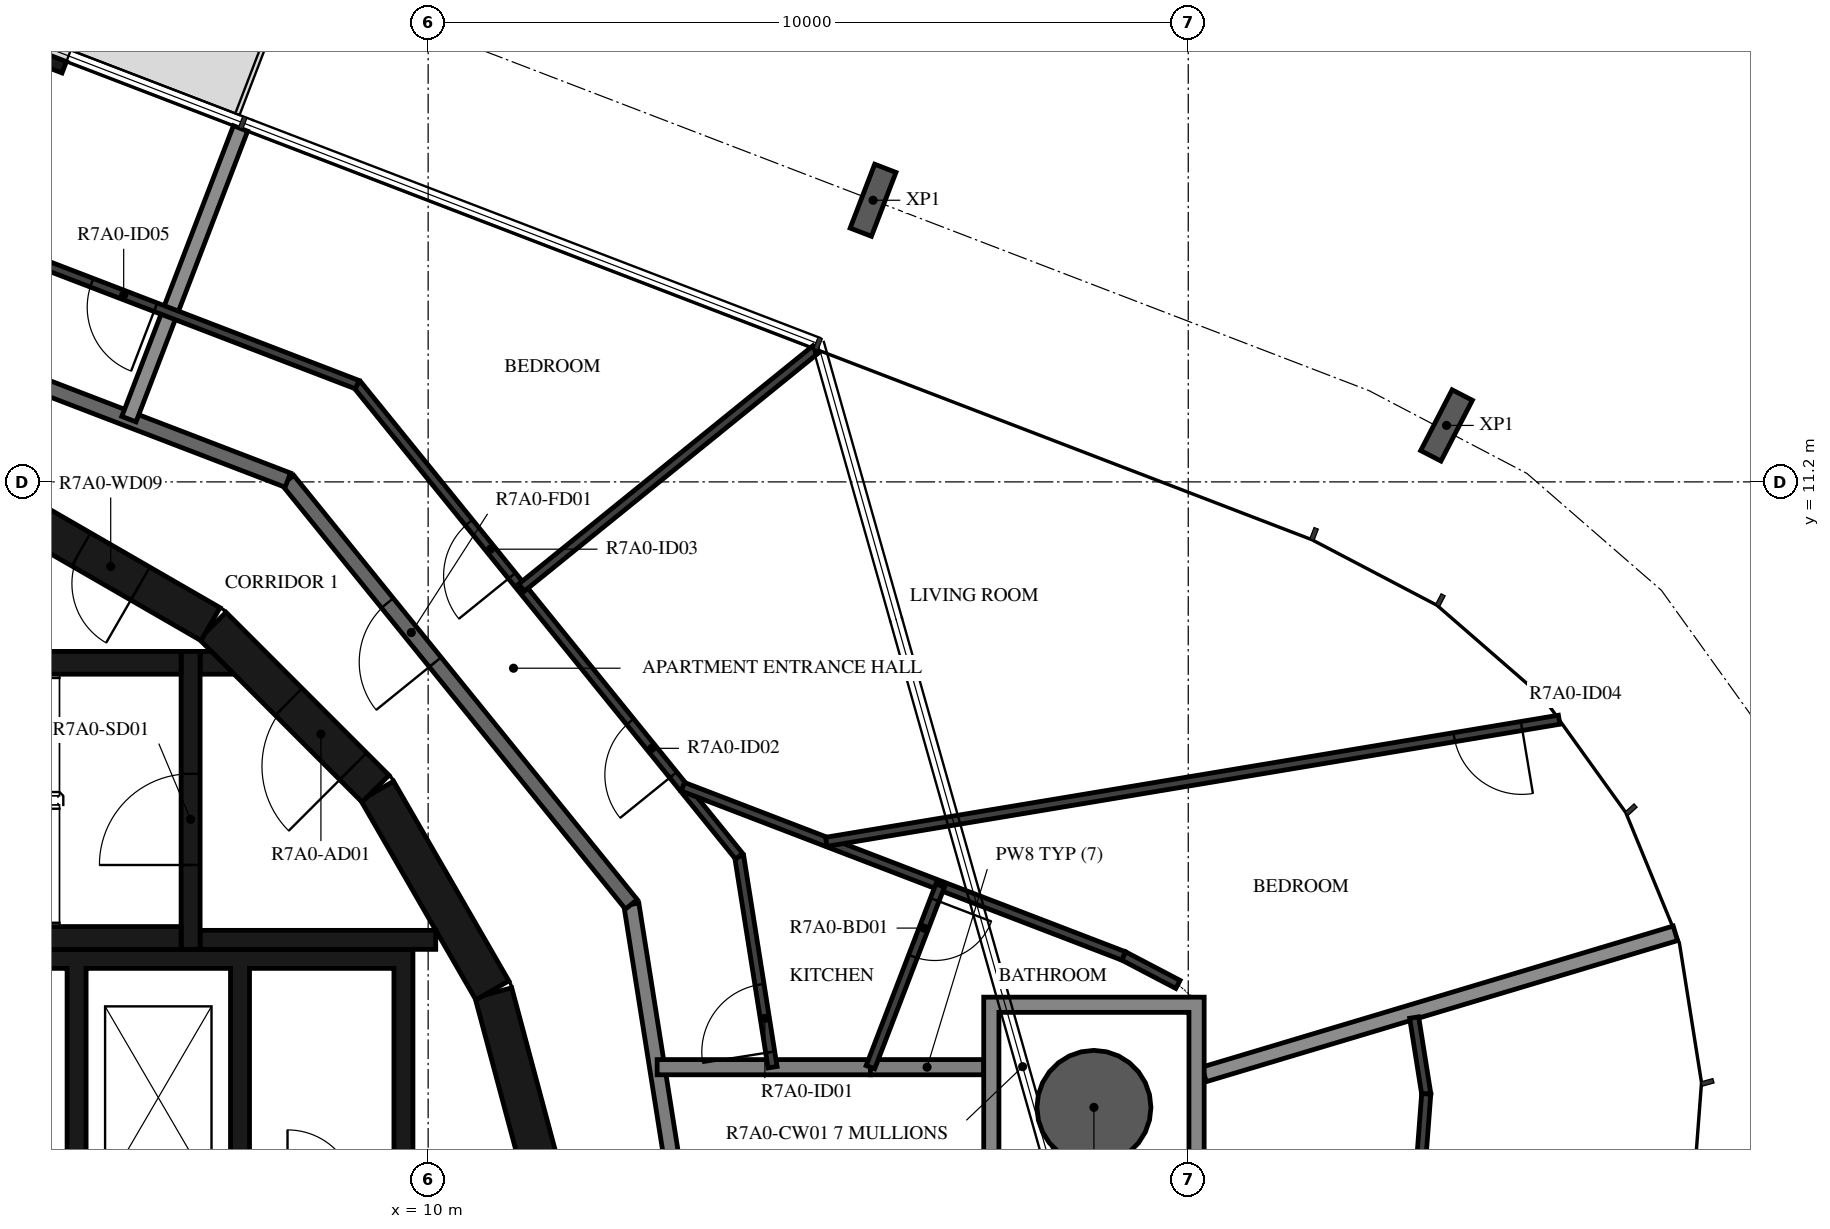
"""IFC4 building model, lengths in metres.
Left out: names, types, materials, properties, quantities, classifications, styles, units other than length and angle.
Written with IfcOpenShell. Run it as: python <this file> out.ifc"""

import sys

from ifc_helpers import new_model, si_unit, direction, frame, frame_2d, origin, origin_2d, place, context, subcontext, project, spatial, polyline, rectangle, hollow_circle, i_section, outline, extrude, element, fill, save


model = new_model("IFC4")
c1 = context("Model", 3, precision=1e-05, world=origin(), true_north=direction((0.0, 1.0)))
c2 = subcontext(c1, "Body", "Model", "MODEL_VIEW")
j1 = project(units=[si_unit("LENGTHUNIT", "METRE"), si_unit("PLANEANGLEUNIT", "RADIAN")], contexts=[c1])
p1 = place(None, origin())
s1 = spatial("IfcSite", under=j1, at=p1, CompositionType="ELEMENT")
p2 = place(p1, origin())
s2 = spatial("IfcBuilding", under=s1, at=p2, CompositionType="ELEMENT")
p3 = place(p2, frame((0.0, 0.0, 270.4)))
s3 = spatial("IfcBuildingStorey", under=s2, at=p3, CompositionType="ELEMENT", Elevation=270.4)
p4 = place(p3, frame((18.76, 2.971, -0.38), z_axis=(0.0, 0.0, 1.0), x_axis=(1.0, 0.0, 0.0)))
e1 = element("IfcColumn", 1, at=p4, inside=s3, PredefinedType="COLUMN", context=c2, shape_type="SweptSolid", body=[
    extrude(hollow_circle(Radius=0.75, WallThickness=0.035, at=origin_2d()), origin(), (0.0, 0.0, 1.0), 3.5),
])
for number, where, z_axis, x_axis in (
    (2, (23.398, 11.943, -0.38), (0.0, 0.0, 1.0), (0.888, -0.459, 0.0)),
    (3, (15.854, 14.905, -0.38), (0.0, 0.0, 1.0), (0.934, -0.358, 0.0)),
):
    element("IfcColumn", number, at=place(p3, frame(where, z_axis=z_axis, x_axis=x_axis)), inside=s3, PredefinedType="COLUMN", context=c2, shape_type="SweptSolid", body=[
        extrude(i_section(OverallWidth=0.3, OverallDepth=0.9, WebThickness=0.019, FlangeThickness=0.035, FilletRadius=0.03, at=origin_2d()), origin(), (0.0, 0.0, 1.0), 3.5),
    ])
p5 = place(p3, frame((5.212, 16.655, 0.0), z_axis=(0.0, 0.0, 1.0), x_axis=(-0.933579413923, 0.358370587381, 0.0)))
e4 = element("IfcWall", 4, at=p5, inside=s3, PredefinedType="STANDARD", context=c2, shape_type="SweptSolid", body=[
    extrude(rectangle(XDim=3.2, YDim=0.16, at=frame_2d((1.6, 0.0))), origin(), (0.0, 0.0, 1.0), 3.12),
])
p6 = place(p5, frame((0.4, 0.0, 0.0)))
e5 = element("IfcOpeningElement", 5, at=p6, cuts=e4, PredefinedType="OPENING", context=c2, shape_type="SweptSolid", body=[
    extrude(rectangle(XDim=2.4, YDim=2.4, at=frame_2d((1.2, 1.2))), frame((0.0, 0.09, 0.0), z_axis=(0.0, -1.0, 0.0), x_axis=(1.0, 0.0, 0.0)), (0.0, 0.0, 1.0), 0.18),
])
for number, where, z_axis, x_axis in (
    (6, (11.643, 1.55, 0.0), (0.0, 0.0, 1.0), (-0.259, 0.966, 0.0)),
    (7, (10.845, 4.51, 0.0), (0.0, 0.0, 1.0), (-0.5, 0.866, 0.0)),
):
    element("IfcWall", number, at=place(p3, frame(where, z_axis=z_axis, x_axis=x_axis)), inside=s3, PredefinedType="SHEAR", context=c2, shape_type="SweptSolid", body=[
        extrude(rectangle(XDim=3.033, YDim=0.5, at=frame_2d((1.516, 0.0))), origin(), (0.0, 0.0, 1.0), 3.12),
    ])
p7 = place(p3, frame((9.308, 7.164, 0.0), z_axis=(0.0, 0.0, 1.0), x_axis=(-0.707106781187, 0.707106781187, 0.0)))
e8 = element("IfcWall", 8, at=p7, inside=s3, PredefinedType="SHEAR", context=c2, shape_type="SweptSolid", body=[
    extrude(rectangle(XDim=3.032, YDim=0.5, at=frame_2d((1.516, 0.0))), origin(), (0.0, 0.0, 1.0), 3.12),
])
p8 = place(p7, frame((0.416, 0.0, 0.0)))
e9 = element("IfcOpeningElement", 9, at=p8, cuts=e8, PredefinedType="OPENING", context=c2, shape_type="SweptSolid", body=[
    extrude(rectangle(XDim=1.2, YDim=2.1, at=frame_2d((0.6, 1.05))), frame((0.0, 0.26, 0.0), z_axis=(0.0, -1.0, 0.0), x_axis=(1.0, 0.0, 0.0)), (0.0, 0.0, 1.0), 0.52),
])
p9 = place(p3, frame((7.137, 9.329, 0.0), z_axis=(0.0, 0.0, 1.0), x_axis=(-0.865975092491, 0.500087131594, 0.0)))
e10 = element("IfcWall", 10, at=p9, inside=s3, PredefinedType="SHEAR", context=c2, shape_type="SweptSolid", body=[
    extrude(rectangle(XDim=3.033, YDim=0.5, at=frame_2d((1.516, 0.0))), origin(), (0.0, 0.0, 1.0), 3.12),
])
p10 = place(p9, frame((1.066, 0.0, 0.0)))
e11 = element("IfcOpeningElement", 11, at=p10, cuts=e10, PredefinedType="OPENING", context=c2, shape_type="SweptSolid", body=[
    extrude(rectangle(XDim=0.9, YDim=2.1, at=frame_2d((0.45, 1.05))), frame((0.0, 0.26, 0.0), z_axis=(0.0, -1.0, 0.0), x_axis=(1.0, 0.0, 0.0)), (0.0, 0.0, 1.0), 0.52),
])
for number, where, z_axis, x_axis in (
    (12, (0.0, 5.2, 0.0), (0.0, 0.0, 1.0), (1.0, 0.0, 0.0)),
    (13, (0.0, 8.82, 0.0), (0.0, 0.0, 1.0), (1.0, 0.0, 0.0)),
):
    element("IfcWall", number, at=place(p3, frame(where, z_axis=z_axis, x_axis=x_axis)), inside=s3, PredefinedType="SHEAR", context=c2, shape_type="SweptSolid", body=[
        extrude(rectangle(XDim=6.75, YDim=0.3, at=frame_2d((3.375, 0.0))), origin(), (0.0, 0.0, 1.0), 3.12),
    ])
p11 = place(p3, frame((6.875, 5.05, 0.0), z_axis=(0.0, 0.0, 1.0), x_axis=(0.0, 1.0, 0.0)))
e14 = element("IfcWall", 14, at=p11, inside=s3, PredefinedType="SHEAR", context=c2, shape_type="SweptSolid", body=[
    extrude(rectangle(XDim=3.92, YDim=0.25, at=frame_2d((1.96, 0.0))), origin(), (0.0, 0.0, 1.0), 3.12),
])
p12 = place(p11, frame((1.11, 0.0, 0.0)))
e15 = element("IfcOpeningElement", 15, at=p12, cuts=e14, PredefinedType="OPENING", context=c2, shape_type="SweptSolid", body=[
    extrude(rectangle(XDim=1.2, YDim=2.1, at=frame_2d((0.6, 1.05))), frame((0.0, 0.135, 0.0), z_axis=(0.0, -1.0, 0.0), x_axis=(1.0, 0.0, 0.0)), (0.0, 0.0, 1.0), 0.27),
])
p13 = place(p3, frame((7.0, 5.175, 0.0), z_axis=(0.0, 0.0, 1.0), x_axis=(1.0, 0.0, 0.0)))
e16 = element("IfcWall", 16, at=p13, inside=s3, PredefinedType="SHEAR", context=c2, shape_type="SweptSolid", body=[
    extrude(rectangle(XDim=3.1, YDim=0.25, at=frame_2d((1.55, 0.0))), origin(), (0.0, 0.0, 1.0), 3.12),
])
p14 = place(p3, origin())
e17 = element("IfcWall", 17, at=p14, inside=s3, PredefinedType="SHEAR", context=c2, shape_type="SweptSolid", body=[
    extrude(outline(polyline([(7.448, 8.67), (7.0, 8.67), (7.0, 8.97), (7.148, 8.97), (7.448, 8.67)])), origin(), (0.0, 0.0, 1.0), 3.12),
])
p15 = place(p3, origin())
e18 = element("IfcWall", 18, at=p15, inside=s3, PredefinedType="SHEAR", context=c2, shape_type="SweptSolid", body=[
    extrude(outline(polyline([(-9.8, 1.9), (-9.55, 1.9), (-9.55, 4.8), (3.1, 4.8), (3.1, 1.9), (3.35, 1.9), (3.35, 4.8), (5.25, 4.8), (5.25, 1.9), (5.5, 1.9), (5.5, 4.8), (7.4, 4.8), (7.4, 1.9), (7.65, 1.9), (7.65, 4.8), (9.55, 4.8), (9.55, 1.9), (9.8, 1.9), (9.8, 4.8), (9.8, 5.05), (-9.8, 5.05), (-9.8, 4.8), (-9.8, 1.9)])), origin(), (0.0, 0.0, 1.0), 3.12),
])
p16 = place(p3, frame((13.797, -1.45, 0.0), z_axis=(0.0, 0.0, 1.0), x_axis=(-0.156421704315, 0.987690361611, 0.0)))
e19 = element("IfcWall", 19, at=p16, inside=s3, PredefinedType="STANDARD", context=c2, shape_type="SweptSolid", body=[
    extrude(rectangle(XDim=7.181, YDim=0.2, at=frame_2d((3.591, 0.0))), origin(), (0.0, 0.0, 1.0), 3.12),
])
p17 = place(p3, frame((12.673, 5.643, 0.0), z_axis=(0.0, 0.0, 1.0), x_axis=(-0.629302871585, 0.777160148113, 0.0)))
e20 = element("IfcWall", 20, at=p17, inside=s3, PredefinedType="STANDARD", context=c2, shape_type="SweptSolid", body=[
    extrude(rectangle(XDim=7.181, YDim=0.2, at=frame_2d((3.59, 0.0))), origin(), (0.0, 0.0, 1.0), 3.12),
])
p18 = place(p17, frame((4.1, 0.0, 0.0)))
e21 = element("IfcOpeningElement", 21, at=p18, cuts=e20, PredefinedType="OPENING", context=c2, shape_type="SweptSolid", body=[
    extrude(rectangle(XDim=1.0, YDim=2.1, at=frame_2d((0.5, 1.05))), frame((0.0, 0.11, 0.0), z_axis=(0.0, -1.0, 0.0), x_axis=(1.0, 0.0, 0.0)), (0.0, 0.0, 1.0), 0.22),
])
p19 = place(p3, frame((8.154, 11.223, 0.0), z_axis=(0.0, 0.0, 1.0), x_axis=(-0.93359073609, 0.358341090983, 0.0)))
e22 = element("IfcWall", 22, at=p19, inside=s3, PredefinedType="STANDARD", context=c2, shape_type="SweptSolid", body=[
    extrude(rectangle(XDim=7.181, YDim=0.2, at=frame_2d((3.59, 0.0))), origin(), (0.0, 0.0, 1.0), 3.12),
])
p20 = place(p3, frame((15.819, 3.5, 0.0), z_axis=(0.0, 0.0, 1.0), x_axis=(-1.0, 0.0, 0.0)))
e23 = element("IfcWall", 23, at=p20, inside=s3, PredefinedType="STANDARD", context=c2, shape_type="SweptSolid", body=[
    extrude(rectangle(XDim=2.806, YDim=0.2, at=frame_2d((1.403, 0.0))), origin(), (0.0, 0.0, 1.0), 3.12),
])
p21 = place(p3, frame((17.309, 3.5, 0.0), z_axis=(0.0, 0.0, 1.0), x_axis=(-1.0, 0.0, 0.0)))
e24 = element("IfcWall", 24, at=p21, inside=s3, PredefinedType="STANDARD", context=c2, shape_type="SweptSolid", body=[
    extrude(rectangle(XDim=1.49, YDim=0.2, at=frame_2d((0.745, 0.0))), origin(), (0.0, 0.0, 1.0), 3.12),
])
p22 = place(p3, frame((7.532, 15.85, 0.0), z_axis=(0.0, 0.0, 1.0), x_axis=(-0.358355996975, -0.933585014571, 0.0)))
e25 = element("IfcWall", 25, at=p22, inside=s3, PredefinedType="STANDARD", context=c2, shape_type="SweptSolid", body=[
    extrude(rectangle(XDim=4.096, YDim=0.2, at=frame_2d((2.048, 0.0))), origin(), (0.0, 0.0, 1.0), 2.73),
])
p23 = place(p3, frame((20.209, 3.405, 0.0), z_axis=(0.0, 0.0, 1.0), x_axis=(0.957991224208, 0.286797514529, 0.0)))
e26 = element("IfcWall", 26, at=p23, inside=s3, PredefinedType="STANDARD", context=c2, shape_type="SweptSolid", body=[
    extrude(rectangle(XDim=6.471, YDim=0.2, at=frame_2d((3.236, 0.0))), origin(), (0.0, 0.0, 1.0), 2.73),
])
p24 = place(p3, frame((14.531, 3.5, 0.0), z_axis=(0.0, 0.0, 1.0), x_axis=(-0.1564580042, 0.987684612071, 0.0)))
e27 = element("IfcWall", 27, at=p24, inside=s3, PredefinedType="PARTITIONING", context=c2, shape_type="SweptSolid", body=[
    extrude(rectangle(XDim=2.809, YDim=0.12, at=frame_2d((1.404, 0.0))), origin(), (0.0, 0.0, 1.0), 3.12),
])
p25 = place(p24, frame((0.2, 0.0, 0.0)))
e28 = element("IfcOpeningElement", 28, at=p25, cuts=e27, PredefinedType="OPENING", context=c2, shape_type="SweptSolid", body=[
    extrude(rectangle(XDim=0.9, YDim=2.1, at=frame_2d((0.45, 1.05))), frame((0.0, 0.07, 0.0), z_axis=(0.0, -1.0, 0.0), x_axis=(1.0, 0.0, 0.0)), (0.0, 0.0, 1.0), 0.14),
])
p26 = place(p3, frame((14.092, 6.274, 0.0), z_axis=(0.0, 0.0, 1.0), x_axis=(-0.62933367237, 0.777135206268, 0.0)))
e29 = element("IfcWall", 29, at=p26, inside=s3, PredefinedType="PARTITIONING", context=c2, shape_type="SweptSolid", body=[
    extrude(rectangle(XDim=7.985, YDim=0.12, at=frame_2d((3.992, 0.0))), origin(), (0.0, 0.0, 1.0), 3.12),
])
p27 = place(p26, frame((1.378, 0.0, 0.0)))
e30 = element("IfcOpeningElement", 30, at=p27, cuts=e29, PredefinedType="OPENING", context=c2, shape_type="SweptSolid", body=[
    extrude(rectangle(XDim=0.9, YDim=2.1, at=frame_2d((0.45, 1.05))), frame((0.0, 0.07, 0.0), z_axis=(0.0, -1.0, 0.0), x_axis=(1.0, 0.0, 0.0)), (0.0, 0.0, 1.0), 0.14),
])
p28 = place(p26, frame((4.749, 0.0, 0.0)))
e31 = element("IfcOpeningElement", 31, at=p28, cuts=e29, PredefinedType="OPENING", context=c2, shape_type="SweptSolid", body=[
    extrude(rectangle(XDim=0.9, YDim=2.1, at=frame_2d((0.45, 1.05))), frame((0.0, 0.07, 0.0), z_axis=(0.0, -1.0, 0.0), x_axis=(1.0, 0.0, 0.0)), (0.0, 0.0, 1.0), 0.14),
])
p29 = place(p3, frame((9.067, 12.479, 0.0), z_axis=(0.0, 0.0, 1.0), x_axis=(-0.933579449035, 0.358370495911, 0.0)))
e32 = element("IfcWall", 32, at=p29, inside=s3, PredefinedType="PARTITIONING", context=c2, shape_type="SweptSolid", body=[
    extrude(rectangle(XDim=7.985, YDim=0.12, at=frame_2d((3.992, 0.0))), origin(), (0.0, 0.0, 1.0), 3.12),
])
p30 = place(p29, frame((2.841, 0.0, 0.0)))
e33 = element("IfcOpeningElement", 33, at=p30, cuts=e32, PredefinedType="OPENING", context=c2, shape_type="SweptSolid", body=[
    extrude(rectangle(XDim=0.9, YDim=2.1, at=frame_2d((0.45, 1.05))), frame((0.0, 0.07, 0.0), z_axis=(0.0, -1.0, 0.0), x_axis=(1.0, 0.0, 0.0)), (0.0, 0.0, 1.0), 0.14),
])
p31 = place(p3, frame((19.865, 4.589, 0.0), z_axis=(0.0, 0.0, 1.0), x_axis=(-0.885855229108, 0.46396175819, 0.0)))
e34 = element("IfcWall", 34, at=p31, inside=s3, PredefinedType="PARTITIONING", context=c2, shape_type="SweptSolid", body=[
    extrude(rectangle(XDim=0.807, YDim=0.12, at=frame_2d((0.403, 0.0))), origin(), (0.0, 0.0, 1.0), 3.12),
])
p32 = place(p3, frame((19.15, 4.963, 0.0), z_axis=(0.0, 0.0, 1.0), x_axis=(-0.933571304602, 0.358391711992, 0.0)))
e35 = element("IfcWall", 35, at=p32, inside=s3, PredefinedType="PARTITIONING", context=c2, shape_type="SweptSolid", body=[
    extrude(rectangle(XDim=6.212, YDim=0.12, at=frame_2d((3.106, 0.0))), origin(), (0.0, 0.0, 1.0), 3.12),
])
p33 = place(p3, frame((16.737, 5.89, 0.0), z_axis=(0.0, 0.0, 1.0), x_axis=(-0.358397454141, -0.933569100209, 0.0)))
e36 = element("IfcWall", 36, at=p33, inside=s3, PredefinedType="PARTITIONING", context=c2, shape_type="SweptSolid", body=[
    extrude(rectangle(XDim=2.56, YDim=0.12, at=frame_2d((1.28, 0.0))), origin(), (0.0, 0.0, 1.0), 3.12),
])
p34 = place(p33, frame((0.2, 0.0, 0.0)))
e37 = element("IfcOpeningElement", 37, at=p34, cuts=e36, PredefinedType="OPENING", context=c2, shape_type="SweptSolid", body=[
    extrude(rectangle(XDim=0.8, YDim=2.1, at=frame_2d((0.4, 1.05))), frame((0.0, 0.07, 0.0), z_axis=(0.0, -1.0, 0.0), x_axis=(1.0, 0.0, 0.0)), (0.0, 0.0, 1.0), 0.14),
])
p35 = place(p3, frame((24.88, 8.071, 0.0), z_axis=(0.0, 0.0, 1.0), x_axis=(-0.986414168431, -0.164277473558, 0.0)))
e38 = element("IfcWall", 38, at=p35, inside=s3, PredefinedType="PARTITIONING", context=c2, shape_type="SweptSolid", body=[
    extrude(rectangle(XDim=9.774, YDim=0.12, at=frame_2d((4.887, 0.0))), origin(), (0.0, 0.0, 1.0), 3.12),
])
p36 = place(p35, frame((0.5, 0.0, 0.0)))
e39 = element("IfcOpeningElement", 39, at=p36, cuts=e38, PredefinedType="OPENING", context=c2, shape_type="SweptSolid", body=[
    extrude(rectangle(XDim=0.9, YDim=2.1, at=frame_2d((0.45, 1.05))), frame((0.0, 0.07, 0.0), z_axis=(0.0, -1.0, 0.0), x_axis=(1.0, 0.0, 0.0)), (0.0, 0.0, 1.0), 0.14),
])
p37 = place(p3, frame((15.101, 12.945, 0.0), z_axis=(0.0, 0.0, 1.0), x_axis=(-0.777178675378, -0.629279990575, 0.0)))
e40 = element("IfcWall", 40, at=p37, inside=s3, PredefinedType="PARTITIONING", context=c2, shape_type="SweptSolid", body=[
    extrude(rectangle(XDim=4.982, YDim=0.12, at=frame_2d((2.491, 0.0))), origin(), (0.0, 0.0, 1.0), 3.12),
])
p38 = place(p3, frame((22.972, 4.153, 0.0), z_axis=(0.0, 0.0, 1.0), x_axis=(0.156209385929, -0.987723963336, 0.0)))
e41 = element("IfcWall", 41, at=p38, inside=s3, PredefinedType="PARTITIONING", context=c2, shape_type="SweptSolid", body=[
    extrude(rectangle(XDim=1.016, YDim=0.12, at=frame_2d((0.508, 0.0))), origin(), (0.0, 0.0, 1.0), 3.12),
])
p39 = place(p3, frame((23.131, 3.149, 0.0), z_axis=(0.0, 0.0, 1.0), x_axis=(-0.075446997935, -0.99714981347, 0.0)))
e42 = element("IfcWall", 42, at=p39, inside=s3, PredefinedType="PARTITIONING", context=c2, shape_type="SweptSolid", body=[
    extrude(rectangle(XDim=1.016, YDim=0.12, at=frame_2d((0.508, 0.0))), origin(), (0.0, 0.0, 1.0), 3.12),
])
p40 = place(p3, origin())
e43 = element("IfcWall", 43, at=p40, inside=s3, PredefinedType="STANDARD", context=c2, shape_type="SweptSolid", body=[
    extrude(outline(polyline([(20.209, 4.421), (20.209, 1.521), (17.309, 1.521), (17.309, 4.421), (20.209, 4.421)]), holes=[polyline([(17.51, 1.721), (20.01, 1.721), (20.01, 4.221), (17.51, 4.221), (17.51, 1.721)])]), origin(), (0.0, 0.0, 1.0), 3.12),
])
p41 = place(p12, origin())
e44 = element("IfcDoor", 44, at=p41, inside=s3, OperationType="SINGLE_SWING_LEFT", PredefinedType="DOOR", context=c2, shape_type="SweptSolid", body=[
    extrude(rectangle(XDim=1.2, YDim=2.1, at=frame_2d((0.6, 1.05))), frame((0.0, 0.025, 0.0), z_axis=(0.0, -1.0, 0.0), x_axis=(1.0, 0.0, 0.0)), (0.0, 0.0, 1.0), 0.05),
])
fill(e15, e44)
p42 = place(p8, origin())
e45 = element("IfcDoor", 45, at=p42, inside=s3, OperationType="SINGLE_SWING_RIGHT", PredefinedType="DOOR", context=c2, shape_type="SweptSolid", body=[
    extrude(rectangle(XDim=1.2, YDim=2.1, at=frame_2d((0.6, 1.05))), frame((0.0, 0.025, 0.0), z_axis=(0.0, -1.0, 0.0), x_axis=(1.0, 0.0, 0.0)), (0.0, 0.0, 1.0), 0.05),
])
fill(e9, e45)
p43 = place(p10, origin())
e46 = element("IfcDoor", 46, at=p43, inside=s3, OperationType="SINGLE_SWING_LEFT", PredefinedType="DOOR", context=c2, shape_type="SweptSolid", body=[
    extrude(rectangle(XDim=0.9, YDim=2.1, at=frame_2d((0.45, 1.05))), frame((0.0, 0.025, 0.0), z_axis=(0.0, -1.0, 0.0), x_axis=(1.0, 0.0, 0.0)), (0.0, 0.0, 1.0), 0.05),
])
fill(e11, e46)
p44 = place(p18, origin())
e47 = element("IfcDoor", 47, at=p44, inside=s3, OperationType="SINGLE_SWING_LEFT", PredefinedType="DOOR", context=c2, shape_type="SweptSolid", body=[
    extrude(rectangle(XDim=1.0, YDim=2.1, at=frame_2d((0.5, 1.05))), frame((0.0, 0.025, 0.0), z_axis=(0.0, -1.0, 0.0), x_axis=(1.0, 0.0, 0.0)), (0.0, 0.0, 1.0), 0.05),
])
fill(e21, e47)
p45 = place(p25, origin())
e48 = element("IfcDoor", 48, at=p45, inside=s3, OperationType="SINGLE_SWING_LEFT", PredefinedType="DOOR", context=c2, shape_type="SweptSolid", body=[
    extrude(rectangle(XDim=0.9, YDim=2.1, at=frame_2d((0.45, 1.05))), frame((0.0, 0.025, 0.0), z_axis=(0.0, -1.0, 0.0), x_axis=(1.0, 0.0, 0.0)), (0.0, 0.0, 1.0), 0.05),
])
fill(e28, e48)
p46 = place(p27, origin())
e49 = element("IfcDoor", 49, at=p46, inside=s3, OperationType="SINGLE_SWING_LEFT", PredefinedType="DOOR", context=c2, shape_type="SweptSolid", body=[
    extrude(rectangle(XDim=0.9, YDim=2.1, at=frame_2d((0.45, 1.05))), frame((0.0, 0.025, 0.0), z_axis=(0.0, -1.0, 0.0), x_axis=(1.0, 0.0, 0.0)), (0.0, 0.0, 1.0), 0.05),
])
fill(e30, e49)
p47 = place(p28, origin())
e50 = element("IfcDoor", 50, at=p47, inside=s3, OperationType="SINGLE_SWING_LEFT", PredefinedType="DOOR", context=c2, shape_type="SweptSolid", body=[
    extrude(rectangle(XDim=0.9, YDim=2.1, at=frame_2d((0.45, 1.05))), frame((0.0, 0.025, 0.0), z_axis=(0.0, -1.0, 0.0), x_axis=(1.0, 0.0, 0.0)), (0.0, 0.0, 1.0), 0.05),
])
fill(e31, e50)
p48 = place(p34, origin())
e51 = element("IfcDoor", 51, at=p48, inside=s3, OperationType="SINGLE_SWING_LEFT", PredefinedType="DOOR", context=c2, shape_type="SweptSolid", body=[
    extrude(rectangle(XDim=0.8, YDim=2.1, at=frame_2d((0.4, 1.05))), frame((0.0, 0.025, 0.0), z_axis=(0.0, -1.0, 0.0), x_axis=(1.0, 0.0, 0.0)), (0.0, 0.0, 1.0), 0.05),
])
fill(e37, e51)
p49 = place(p36, origin())
e52 = element("IfcDoor", 52, at=p49, inside=s3, OperationType="SINGLE_SWING_LEFT", PredefinedType="DOOR", context=c2, shape_type="SweptSolid", body=[
    extrude(rectangle(XDim=0.9, YDim=2.1, at=frame_2d((0.45, 1.05))), frame((0.0, 0.025, 0.0), z_axis=(0.0, -1.0, 0.0), x_axis=(1.0, 0.0, 0.0)), (0.0, 0.0, 1.0), 0.05),
])
fill(e39, e52)
p50 = place(p30, origin())
e53 = element("IfcDoor", 53, at=p50, inside=s3, OperationType="SINGLE_SWING_LEFT", PredefinedType="DOOR", context=c2, shape_type="SweptSolid", body=[
    extrude(rectangle(XDim=0.9, YDim=2.1, at=frame_2d((0.45, 1.05))), frame((0.0, 0.025, 0.0), z_axis=(0.0, -1.0, 0.0), x_axis=(1.0, 0.0, 0.0)), (0.0, 0.0, 1.0), 0.05),
])
fill(e33, e53)
save(model, sys.argv[1])
